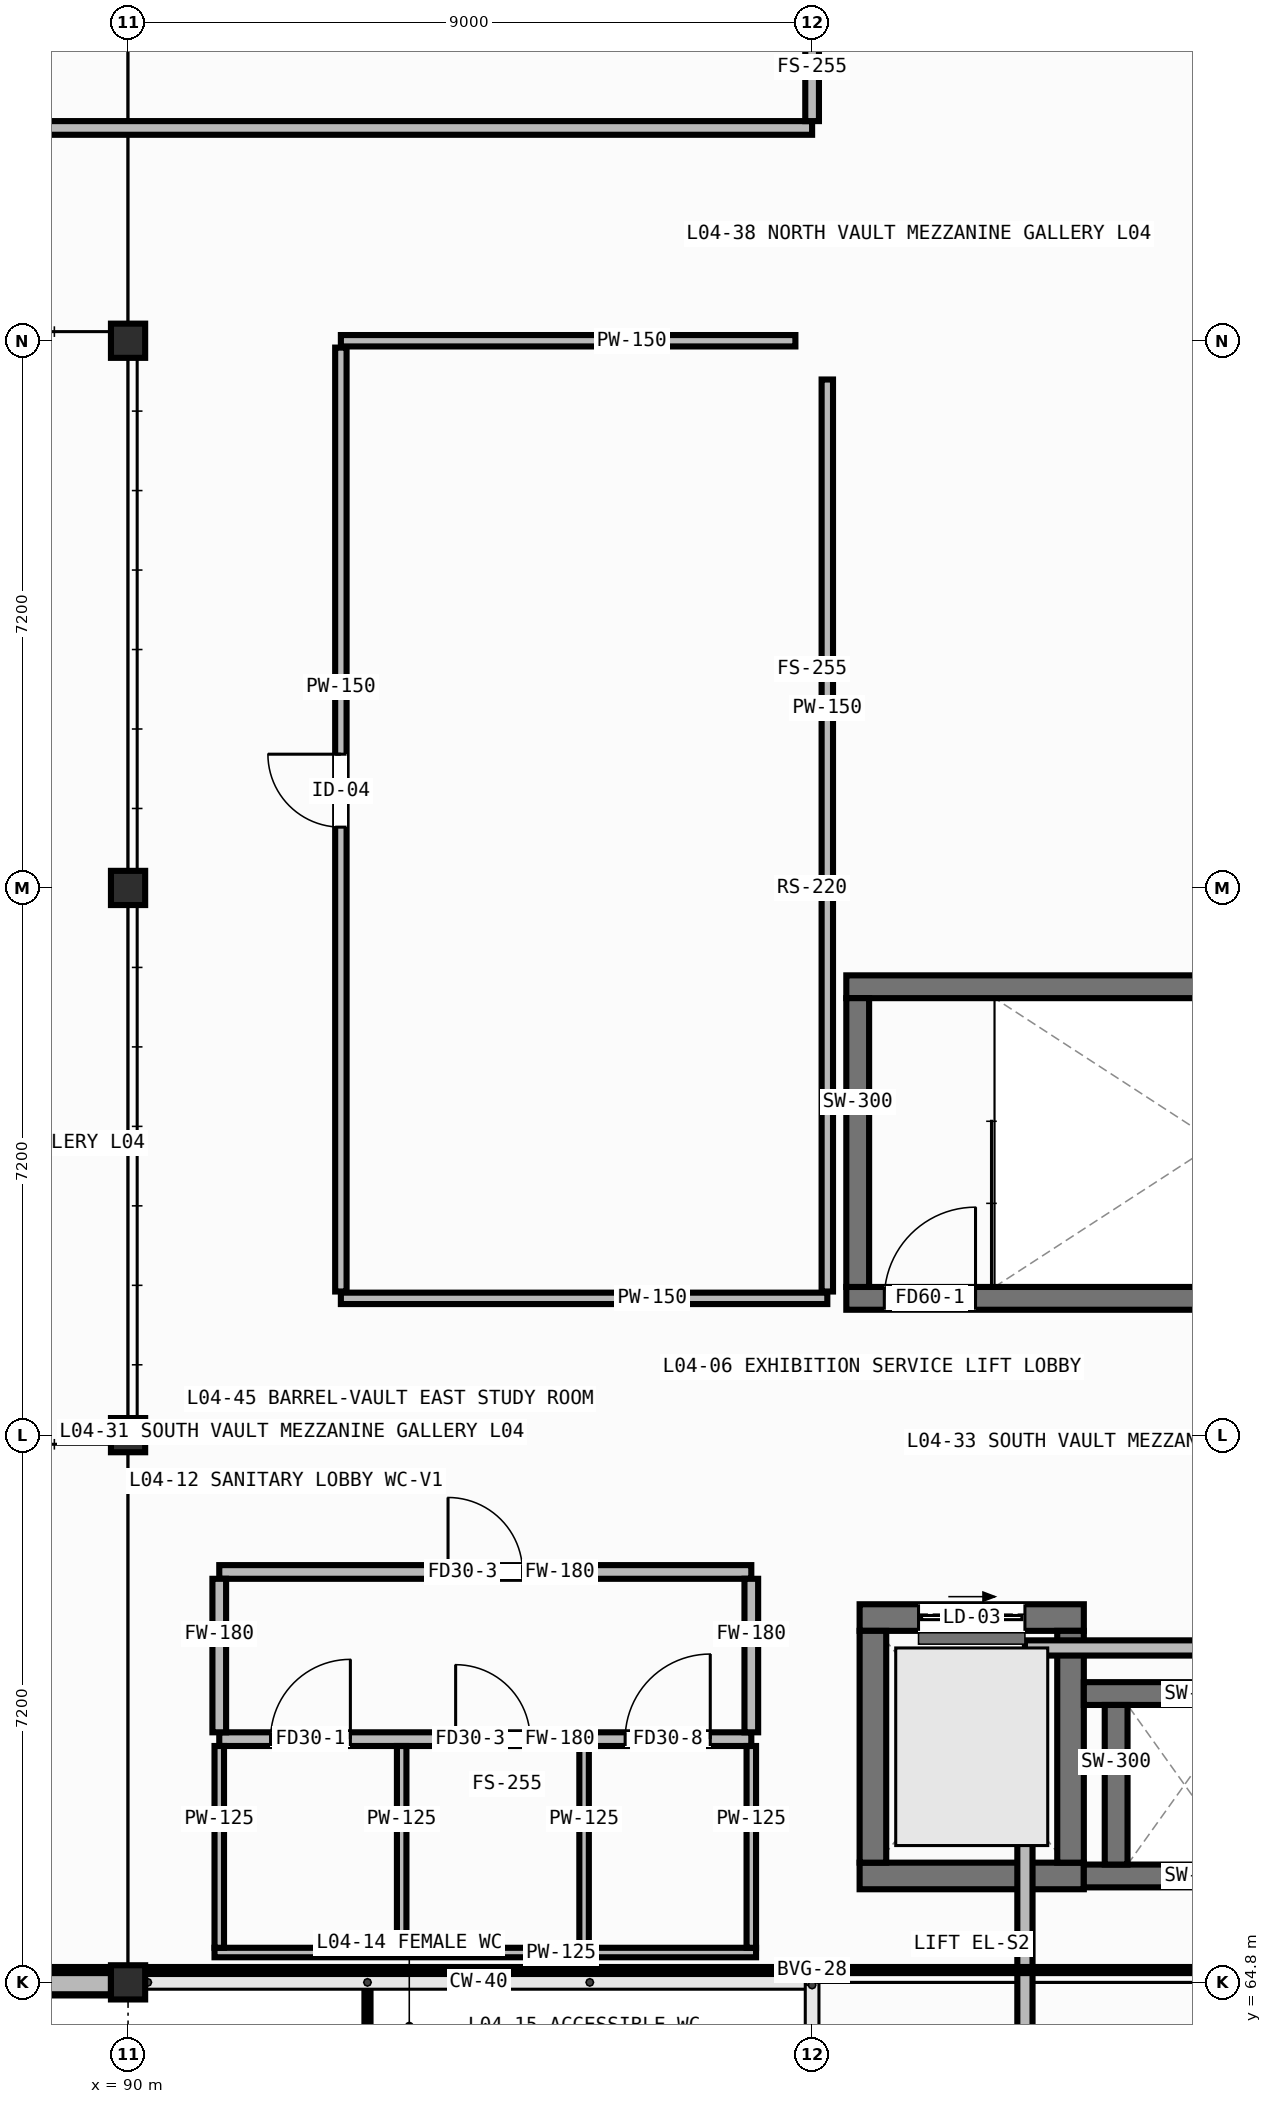
"""IFC4 building model, lengths in metres.
Left out: names, types, materials, properties, quantities, classifications, styles, units other than length and angle.
Written with IfcOpenShell. Run it as: python <this file> out.ifc"""

import sys

from ifc_helpers import new_model, si_unit, direction, frame, frame_2d, origin, origin_2d, place, context, subcontext, project, spatial, rectangle, hollow_rectangle, extrude, element, fill, save


model = new_model("IFC4")
c1 = context("Model", 3, precision=1e-05, world=origin(), true_north=direction((0.0, 1.0)))
c2 = subcontext(c1, "Body", "Model", "MODEL_VIEW")
j1 = project(units=[si_unit("LENGTHUNIT", "METRE"), si_unit("PLANEANGLEUNIT", "RADIAN")], contexts=[c1])
p1 = place(None, origin())
s1 = spatial("IfcSite", under=j1, at=p1, CompositionType="ELEMENT")
p2 = place(p1, origin())
s2 = spatial("IfcBuilding", under=s1, at=p2, CompositionType="ELEMENT")
p3 = place(p2, frame((0.0, 0.0, 12.8)))
s3 = spatial("IfcBuildingStorey", under=s2, at=p3, CompositionType="ELEMENT", Elevation=12.8)
for number, where, z_axis, x_axis in (
    (1, (90.0, 64.8, 0.0), (0.0, 0.0, 1.0), (1.0, 0.0, 0.0)),
    (2, (90.0, 72.0, 0.0), (0.0, 0.0, 1.0), (1.0, 0.0, 0.0)),
    (3, (90.0, 79.2, 0.0), (0.0, 0.0, 1.0), (1.0, 0.0, 0.0)),
    (4, (90.0, 86.4, 0.0), (0.0, 0.0, 1.0), (1.0, 0.0, 0.0)),
):
    element("IfcColumn", number, at=place(p3, frame(where, z_axis=z_axis, x_axis=x_axis)), inside=s3, PredefinedType="COLUMN", context=c2, shape_type="SweptSolid", body=[
        extrude(hollow_rectangle(XDim=0.45, YDim=0.45, WallThickness=0.019, at=origin_2d()), origin(), (0.0, 0.0, 1.0), 3.78),
    ])
p4 = place(p3, frame((81.0, 64.8, 0.0), z_axis=(0.0, 0.0, 1.0), x_axis=(1.0, 0.0, 0.0)))
e5 = element("IfcWall", 5, at=p4, inside=s3, PredefinedType="STANDARD", context=c2, shape_type="SweptSolid", body=[
    extrude(rectangle(XDim=8.775, YDim=0.32, at=frame_2d((4.387, 0.0))), origin(), (0.0, 0.0, 1.0), 3.08),
])
p5 = place(p4, frame((3.087, 0.0, 0.85)))
e6 = element("IfcOpeningElement", 6, at=p5, cuts=e5, PredefinedType="OPENING", context=c2, shape_type="SweptSolid", body=[
    extrude(rectangle(XDim=2.6, YDim=1.6, at=frame_2d((1.3, 0.8))), frame((0.0, 0.172, 0.0), z_axis=(0.0, -1.0, 0.0), x_axis=(1.0, 0.0, 0.0)), (0.0, 0.0, 1.0), 0.344),
])
p6 = place(p3, frame((99.45, 73.8, 0.0), z_axis=(0.0, 0.0, 1.0), x_axis=(1.0, 0.0, 0.0)))
e7 = element("IfcWall", 7, at=p6, inside=s3, PredefinedType="SHEAR", context=c2, shape_type="SweptSolid", body=[
    extrude(rectangle(XDim=8.1, YDim=0.3, at=frame_2d((4.05, 0.0))), origin(), (0.0, 0.0, 1.0), 3.78),
])
p7 = place(p6, frame((0.5, 0.0, 0.0)))
e8 = element("IfcOpeningElement", 8, at=p7, cuts=e7, PredefinedType="OPENING", context=c2, shape_type="SweptSolid", body=[
    extrude(rectangle(XDim=1.2, YDim=2.1, at=frame_2d((0.6, 1.05))), frame((0.0, 0.162, 0.0), z_axis=(0.0, -1.0, 0.0), x_axis=(1.0, 0.0, 0.0)), (0.0, 0.0, 1.0), 0.324),
])
p8 = place(p3, frame((99.45, 77.9, 0.0), z_axis=(0.0, 0.0, 1.0), x_axis=(1.0, 0.0, 0.0)))
e9 = element("IfcWall", 9, at=p8, inside=s3, PredefinedType="SHEAR", context=c2, shape_type="SweptSolid", body=[
    extrude(rectangle(XDim=8.1, YDim=0.3, at=frame_2d((4.05, 0.0))), origin(), (0.0, 0.0, 1.0), 3.78),
])
p9 = place(p3, frame((99.6, 73.95, 0.0), z_axis=(0.0, 0.0, 1.0), x_axis=(0.0, 1.0, 0.0)))
e10 = element("IfcWall", 10, at=p9, inside=s3, PredefinedType="SHEAR", context=c2, shape_type="SweptSolid", body=[
    extrude(rectangle(XDim=3.8, YDim=0.3, at=frame_2d((1.9, 0.0))), origin(), (0.0, 0.0, 1.0), 3.78),
])
p10 = place(p3, frame((99.625, 66.2, 0.0), z_axis=(0.0, 0.0, 1.0), x_axis=(1.0, 0.0, 0.0)))
e11 = element("IfcWall", 11, at=p10, inside=s3, PredefinedType="SHEAR", context=c2, shape_type="SweptSolid", body=[
    extrude(rectangle(XDim=2.95, YDim=0.35, at=frame_2d((1.475, 0.0))), origin(), (0.0, 0.0, 1.0), 3.78),
])
p11 = place(p3, frame((99.625, 69.6, 0.0), z_axis=(0.0, 0.0, 1.0), x_axis=(1.0, 0.0, 0.0)))
e12 = element("IfcWall", 12, at=p11, inside=s3, PredefinedType="SHEAR", context=c2, shape_type="SweptSolid", body=[
    extrude(rectangle(XDim=2.95, YDim=0.35, at=frame_2d((1.475, 0.0))), origin(), (0.0, 0.0, 1.0), 3.78),
])
p12 = place(p11, frame((0.775, 0.0, 0.0)))
e13 = element("IfcOpeningElement", 13, at=p12, cuts=e12, PredefinedType="OPENING", context=c2, shape_type="SweptSolid", body=[
    extrude(rectangle(XDim=1.4, YDim=2.15, at=frame_2d((0.7, 1.075))), frame((0.0, 0.187, 0.0), z_axis=(0.0, -1.0, 0.0), x_axis=(1.0, 0.0, 0.0)), (0.0, 0.0, 1.0), 0.374),
])
for number, where, z_axis, x_axis in (
    (14, (99.8, 66.375, 0.0), (0.0, 0.0, 1.0), (0.0, 1.0, 0.0)),
    (15, (102.4, 66.375, 0.0), (0.0, 0.0, 1.0), (0.0, 1.0, 0.0)),
):
    element("IfcWall", number, at=place(p3, frame(where, z_axis=z_axis, x_axis=x_axis)), inside=s3, PredefinedType="SHEAR", context=c2, shape_type="SweptSolid", body=[
        extrude(rectangle(XDim=3.05, YDim=0.35, at=frame_2d((1.525, 0.0))), origin(), (0.0, 0.0, 1.0), 3.78),
    ])
for number, where, z_axis, x_axis in (
    (16, (102.575, 66.2, 0.0), (0.0, 0.0, 1.0), (1.0, 0.0, 0.0)),
    (17, (102.575, 68.6, 0.0), (0.0, 0.0, 1.0), (1.0, 0.0, 0.0)),
):
    element("IfcWall", number, at=place(p3, frame(where, z_axis=z_axis, x_axis=x_axis)), inside=s3, PredefinedType="SHEAR", context=c2, shape_type="SweptSolid", body=[
        extrude(rectangle(XDim=2.375, YDim=0.3, at=frame_2d((1.188, 0.0))), origin(), (0.0, 0.0, 1.0), 3.78),
    ])
p13 = place(p3, frame((103.0, 66.35, 0.0), z_axis=(0.0, 0.0, 1.0), x_axis=(0.0, 1.0, 0.0)))
e18 = element("IfcWall", 18, at=p13, inside=s3, PredefinedType="SHEAR", context=c2, shape_type="SweptSolid", body=[
    extrude(rectangle(XDim=2.1, YDim=0.3, at=frame_2d((1.05, 0.0))), origin(), (0.0, 0.0, 1.0), 3.78),
])
p14 = place(p3, frame((91.137, 65.192, 0.0), z_axis=(0.0, 0.0, 1.0), x_axis=(1.0, 0.0, 0.0)))
e19 = element("IfcWall", 19, at=p14, inside=s3, PredefinedType="PARTITIONING", context=c2, shape_type="SweptSolid", body=[
    extrude(rectangle(XDim=7.125, YDim=0.125, at=frame_2d((3.562, 0.0))), origin(), (0.0, 0.0, 1.0), 3.78),
])
p15 = place(p3, frame((91.2, 68.0, 0.0), z_axis=(0.0, 0.0, 1.0), x_axis=(1.0, 0.0, 0.0)))
e20 = element("IfcWall", 20, at=p15, inside=s3, PredefinedType="PARTITIONING", context=c2, shape_type="SweptSolid", body=[
    extrude(rectangle(XDim=7.0, YDim=0.18, at=frame_2d((3.5, 0.0))), origin(), (0.0, 0.0, 1.0), 3.78),
])
p16 = place(p15, frame((0.675, 0.0, 0.0)))
e21 = element("IfcOpeningElement", 21, at=p16, cuts=e20, PredefinedType="OPENING", context=c2, shape_type="SweptSolid", body=[
    extrude(rectangle(XDim=1.05, YDim=2.1, at=frame_2d((0.525, 1.05))), frame((0.0, 0.102, 0.0), z_axis=(0.0, -1.0, 0.0), x_axis=(1.0, 0.0, 0.0)), (0.0, 0.0, 1.0), 0.204),
])
p17 = place(p15, frame((3.11, 0.0, 0.0)))
e22 = element("IfcOpeningElement", 22, at=p17, cuts=e20, PredefinedType="OPENING", context=c2, shape_type="SweptSolid", body=[
    extrude(rectangle(XDim=0.98, YDim=2.02, at=frame_2d((0.49, 1.01))), frame((0.0, 0.102, 0.0), z_axis=(0.0, -1.0, 0.0), x_axis=(1.0, 0.0, 0.0)), (0.0, 0.0, 1.0), 0.204),
])
p18 = place(p15, frame((5.34, 0.0, 0.0)))
e23 = element("IfcOpeningElement", 23, at=p18, cuts=e20, PredefinedType="OPENING", context=c2, shape_type="SweptSolid", body=[
    extrude(rectangle(XDim=1.12, YDim=2.08, at=frame_2d((0.56, 1.04))), frame((0.0, 0.102, 0.0), z_axis=(0.0, -1.0, 0.0), x_axis=(1.0, 0.0, 0.0)), (0.0, 0.0, 1.0), 0.204),
])
p19 = place(p3, frame((91.2, 70.2, 0.0), z_axis=(0.0, 0.0, 1.0), x_axis=(1.0, 0.0, 0.0)))
e24 = element("IfcWall", 24, at=p19, inside=s3, PredefinedType="PARTITIONING", context=c2, shape_type="SweptSolid", body=[
    extrude(rectangle(XDim=7.0, YDim=0.18, at=frame_2d((3.5, 0.0))), origin(), (0.0, 0.0, 1.0), 3.78),
])
p20 = place(p19, frame((3.01, 0.0, 0.0)))
e25 = element("IfcOpeningElement", 25, at=p20, cuts=e24, PredefinedType="OPENING", context=c2, shape_type="SweptSolid", body=[
    extrude(rectangle(XDim=0.98, YDim=2.02, at=frame_2d((0.49, 1.01))), frame((0.0, 0.102, 0.0), z_axis=(0.0, -1.0, 0.0), x_axis=(1.0, 0.0, 0.0)), (0.0, 0.0, 1.0), 0.204),
])
for number, where, z_axis, x_axis in (
    (26, (91.2, 68.09, 0.0), (0.0, 0.0, 1.0), (0.0, 1.0, 0.0)),
    (27, (98.2, 68.09, 0.0), (0.0, 0.0, 1.0), (0.0, 1.0, 0.0)),
):
    element("IfcWall", number, at=place(p3, frame(where, z_axis=z_axis, x_axis=x_axis)), inside=s3, PredefinedType="PARTITIONING", context=c2, shape_type="SweptSolid", body=[
        extrude(rectangle(XDim=2.02, YDim=0.18, at=frame_2d((1.01, 0.0))), origin(), (0.0, 0.0, 1.0), 3.78),
    ])
for number, where, z_axis, x_axis in (
    (28, (91.2, 65.255, 0.0), (0.0, 0.0, 1.0), (0.0, 1.0, 0.0)),
    (29, (93.6, 65.255, 0.0), (0.0, 0.0, 1.0), (0.0, 1.0, 0.0)),
    (30, (96.0, 65.255, 0.0), (0.0, 0.0, 1.0), (0.0, 1.0, 0.0)),
    (31, (98.2, 65.255, 0.0), (0.0, 0.0, 1.0), (0.0, 1.0, 0.0)),
):
    element("IfcWall", number, at=place(p3, frame(where, z_axis=z_axis, x_axis=x_axis)), inside=s3, PredefinedType="PARTITIONING", context=c2, shape_type="SweptSolid", body=[
        extrude(rectangle(XDim=2.655, YDim=0.125, at=frame_2d((1.328, 0.0))), origin(), (0.0, 0.0, 1.0), 3.78),
    ])
p21 = place(p3, frame((101.8, 69.2, 0.0), z_axis=(0.0, 0.0, 1.0), x_axis=(1.0, 0.0, 0.0)))
e32 = element("IfcWall", 32, at=p21, inside=s3, PredefinedType="PARTITIONING", context=c2, shape_type="SweptSolid", body=[
    extrude(rectangle(XDim=6.165, YDim=0.2, at=frame_2d((3.083, 0.0))), origin(), (0.0, 0.0, 1.0), 3.78),
])
p22 = place(p3, frame((101.8, 48.09, 0.0), z_axis=(0.0, 0.0, 1.0), x_axis=(0.0, 1.0, 0.0)))
e33 = element("IfcWall", 33, at=p22, inside=s3, PredefinedType="PARTITIONING", context=c2, shape_type="SweptSolid", body=[
    extrude(rectangle(XDim=21.02, YDim=0.2, at=frame_2d((10.51, 0.0))), origin(), (0.0, 0.0, 1.0), 3.78),
])
p23 = place(p22, frame((5.235, 0.0, 0.0)))
e34 = element("IfcOpeningElement", 34, at=p23, cuts=e33, PredefinedType="OPENING", context=c2, shape_type="SweptSolid", body=[
    extrude(rectangle(XDim=1.35, YDim=2.08, at=frame_2d((0.675, 1.04))), frame((0.0, 0.112, 0.0), z_axis=(0.0, -1.0, 0.0), x_axis=(1.0, 0.0, 0.0)), (0.0, 0.0, 1.0), 0.224),
])
p24 = place(p3, frame((92.8, 73.8, 0.0), z_axis=(0.0, 0.0, 1.0), x_axis=(1.0, 0.0, 0.0)))
e35 = element("IfcWall", 35, at=p24, inside=s3, PredefinedType="PARTITIONING", context=c2, shape_type="SweptSolid", body=[
    extrude(rectangle(XDim=6.4, YDim=0.15, at=frame_2d((3.2, 0.0))), origin(), (0.0, 0.0, 1.0), 3.78),
])
p25 = place(p3, frame((92.8, 86.4, 0.0), z_axis=(0.0, 0.0, 1.0), x_axis=(1.0, 0.0, 0.0)))
e36 = element("IfcWall", 36, at=p25, inside=s3, PredefinedType="PARTITIONING", context=c2, shape_type="SweptSolid", body=[
    extrude(rectangle(XDim=5.98, YDim=0.15, at=frame_2d((2.99, 0.0))), origin(), (0.0, 0.0, 1.0), 3.06),
])
p26 = place(p3, frame((92.8, 73.89, 0.0), z_axis=(0.0, 0.0, 1.0), x_axis=(0.0, 1.0, 0.0)))
e37 = element("IfcWall", 37, at=p26, inside=s3, PredefinedType="PARTITIONING", context=c2, shape_type="SweptSolid", body=[
    extrude(rectangle(XDim=12.42, YDim=0.15, at=frame_2d((6.21, 0.0))), origin(), (0.0, 0.0, 1.0), 3.78),
])
p27 = place(p26, frame((6.11, 0.0, 0.0)))
e38 = element("IfcOpeningElement", 38, at=p27, cuts=e37, PredefinedType="OPENING", context=c2, shape_type="SweptSolid", body=[
    extrude(rectangle(XDim=0.96, YDim=2.1, at=frame_2d((0.48, 1.05))), frame((0.0, 0.087, 0.0), z_axis=(0.0, -1.0, 0.0), x_axis=(1.0, 0.0, 0.0)), (0.0, 0.0, 1.0), 0.174),
])
p28 = place(p3, frame((99.2, 73.89, 0.0), z_axis=(0.0, 0.0, 1.0), x_axis=(0.0, 1.0, 0.0)))
e39 = element("IfcWall", 39, at=p28, inside=s3, PredefinedType="PARTITIONING", context=c2, shape_type="SweptSolid", body=[
    extrude(rectangle(XDim=12.0, YDim=0.15, at=frame_2d((6.0, 0.0))), origin(), (0.0, 0.0, 1.0), 3.06),
])
p29 = place(p3, frame((63.0, 89.2, 0.0), z_axis=(0.0, 0.0, 1.0), x_axis=(1.0, 0.0, 0.0)))
e40 = element("IfcWall", 40, at=p29, inside=s3, PredefinedType="PARTITIONING", context=c2, shape_type="SweptSolid", body=[
    extrude(rectangle(XDim=36.0, YDim=0.18, at=frame_2d((18.0, 0.0))), origin(), (0.0, 0.0, 1.0), 3.78),
])
p30 = place(p29, frame((12.575, 0.0, 0.0)))
e41 = element("IfcOpeningElement", 41, at=p30, cuts=e40, PredefinedType="OPENING", context=c2, shape_type="SweptSolid", body=[
    extrude(rectangle(XDim=1.85, YDim=2.12, at=frame_2d((0.925, 1.06))), frame((0.0, 0.102, 0.0), z_axis=(0.0, -1.0, 0.0), x_axis=(1.0, 0.0, 0.0)), (0.0, 0.0, 1.0), 0.204),
])
p31 = place(p3, frame((99.0, 89.29, 0.0), z_axis=(0.0, 0.0, 1.0), x_axis=(0.0, 1.0, 0.0)))
e42 = element("IfcWall", 42, at=p31, inside=s3, PredefinedType="PARTITIONING", context=c2, shape_type="SweptSolid", body=[
    extrude(rectangle(XDim=3.855, YDim=0.18, at=frame_2d((1.927, 0.0))), origin(), (0.0, 0.0, 1.0), 3.06),
])
p32 = place(p7, origin())
e43 = element("IfcDoor", 43, at=p32, inside=s3, OperationType="SINGLE_SWING_RIGHT", PredefinedType="DOOR", context=c2, shape_type="SweptSolid", body=[
    extrude(rectangle(XDim=1.2, YDim=2.1, at=frame_2d((0.6, 1.05))), frame((0.0, 0.025, 0.0), z_axis=(0.0, -1.0, 0.0), x_axis=(1.0, 0.0, 0.0)), (0.0, 0.0, 1.0), 0.05),
])
fill(e8, e43)
p33 = place(p12, origin())
e44 = element("IfcDoor", 44, at=p33, inside=s3, OperationType="SLIDING_TO_RIGHT", PredefinedType="DOOR", context=c2, shape_type="SweptSolid", body=[
    extrude(rectangle(XDim=1.4, YDim=2.15, at=frame_2d((0.7, 1.075))), frame((0.0, 0.025, 0.0), z_axis=(0.0, -1.0, 0.0), x_axis=(1.0, 0.0, 0.0)), (0.0, 0.0, 1.0), 0.05),
])
fill(e13, e44)
p34 = place(p20, origin())
e45 = element("IfcDoor", 45, at=p34, inside=s3, OperationType="SINGLE_SWING_LEFT", PredefinedType="DOOR", context=c2, shape_type="SweptSolid", body=[
    extrude(rectangle(XDim=0.98, YDim=2.02, at=frame_2d((0.49, 1.01))), frame((0.0, 0.025, 0.0), z_axis=(0.0, -1.0, 0.0), x_axis=(1.0, 0.0, 0.0)), (0.0, 0.0, 1.0), 0.05),
])
fill(e25, e45)
p35 = place(p16, origin())
e46 = element("IfcDoor", 46, at=p35, inside=s3, OperationType="SINGLE_SWING_RIGHT", PredefinedType="DOOR", context=c2, shape_type="SweptSolid", body=[
    extrude(rectangle(XDim=1.05, YDim=2.1, at=frame_2d((0.525, 1.05))), frame((0.0, 0.025, 0.0), z_axis=(0.0, -1.0, 0.0), x_axis=(1.0, 0.0, 0.0)), (0.0, 0.0, 1.0), 0.05),
])
fill(e21, e46)
p36 = place(p17, origin())
e47 = element("IfcDoor", 47, at=p36, inside=s3, OperationType="SINGLE_SWING_LEFT", PredefinedType="DOOR", context=c2, shape_type="SweptSolid", body=[
    extrude(rectangle(XDim=0.98, YDim=2.02, at=frame_2d((0.49, 1.01))), frame((0.0, 0.025, 0.0), z_axis=(0.0, -1.0, 0.0), x_axis=(1.0, 0.0, 0.0)), (0.0, 0.0, 1.0), 0.05),
])
fill(e22, e47)
p37 = place(p18, origin())
e48 = element("IfcDoor", 48, at=p37, inside=s3, OperationType="SINGLE_SWING_RIGHT", PredefinedType="DOOR", context=c2, shape_type="SweptSolid", body=[
    extrude(rectangle(XDim=1.12, YDim=2.08, at=frame_2d((0.56, 1.04))), frame((0.0, 0.025, 0.0), z_axis=(0.0, -1.0, 0.0), x_axis=(1.0, 0.0, 0.0)), (0.0, 0.0, 1.0), 0.05),
])
fill(e23, e48)
p38 = place(p27, origin())
e49 = element("IfcDoor", 49, at=p38, inside=s3, OperationType="SINGLE_SWING_RIGHT", PredefinedType="DOOR", context=c2, shape_type="SweptSolid", body=[
    extrude(rectangle(XDim=0.96, YDim=2.1, at=frame_2d((0.48, 1.05))), frame((0.0, 0.025, 0.0), z_axis=(0.0, -1.0, 0.0), x_axis=(1.0, 0.0, 0.0)), (0.0, 0.0, 1.0), 0.05),
])
fill(e38, e49)
save(model, sys.argv[1])
